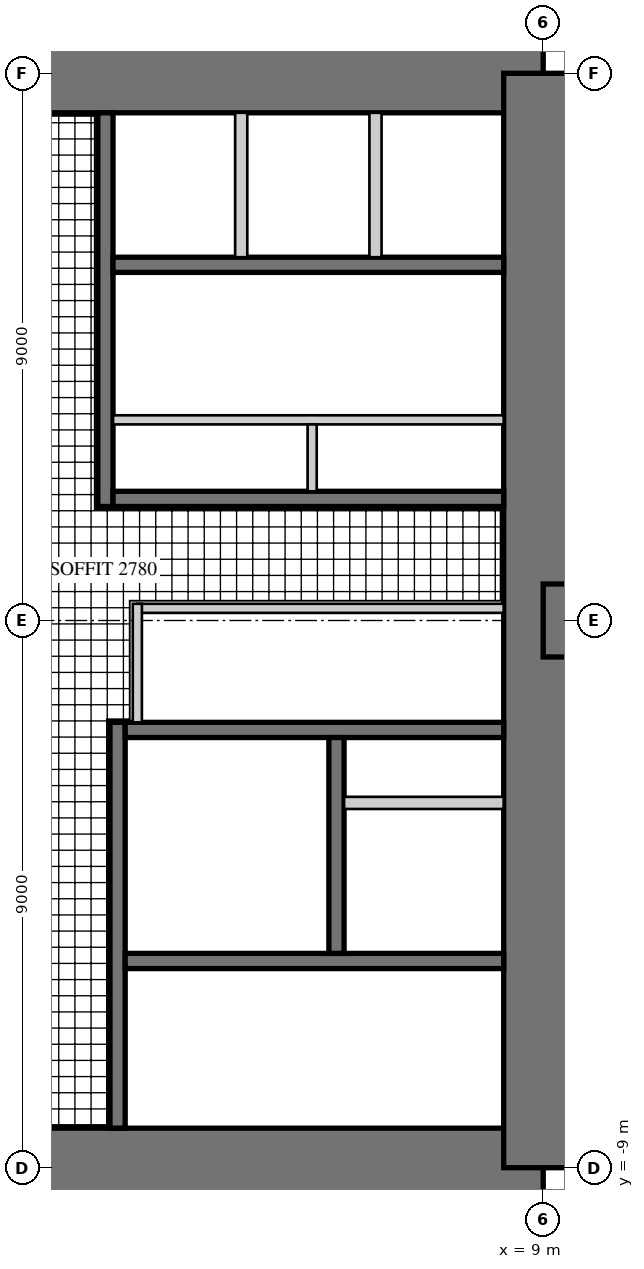
"""IFC4 building model, lengths in metres.
Left out: names, types, materials, properties, quantities, classifications, styles, units other than length and angle.
Written with IfcOpenShell. Run it as: python <this file> out.ifc"""

import sys

from ifc_helpers import new_model, si_unit, direction, frame, frame_2d, origin, place, context, subcontext, project, spatial, rectangle, extrude, element, fill, save


model = new_model("IFC4")
c1 = context("Model", 3, precision=1e-05, world=origin(), true_north=direction((0.0, 1.0)))
c2 = subcontext(c1, "Body", "Model", "MODEL_VIEW")
j1 = project(units=[si_unit("LENGTHUNIT", "METRE"), si_unit("PLANEANGLEUNIT", "RADIAN")], contexts=[c1])
p1 = place(None, origin())
s1 = spatial("IfcSite", under=j1, at=p1, CompositionType="ELEMENT")
p2 = place(p1, origin())
s2 = spatial("IfcBuilding", under=s1, at=p2, CompositionType="ELEMENT")
p3 = place(p2, frame((0.0, 0.0, 124.5)))
s3 = spatial("IfcBuildingStorey", under=s2, at=p3, CompositionType="ELEMENT", Elevation=124.5)
p4 = place(p3, frame((9.0, 9.0, 0.0), z_axis=(0.0, 0.0, 1.0), x_axis=(-1.0, 0.0, 0.0)))
e1 = element("IfcWall", 1, at=p4, inside=s3, PredefinedType="SHEAR", context=c2, shape_type="SweptSolid", body=[
    extrude(rectangle(XDim=18.0, YDim=1.3, at=frame_2d((9.0, 0.0))), origin(), (0.0, 0.0, 1.0), 4.0),
])
p5 = place(p4, frame((9.8, 0.0, 0.0)))
e2 = element("IfcOpeningElement", 2, at=p5, cuts=e1, PredefinedType="OPENING", context=c2, shape_type="SweptSolid", body=[
    extrude(rectangle(XDim=1.0, YDim=2.4, at=frame_2d((0.5, 1.2))), frame((0.0, 0.66, 0.0), z_axis=(0.0, -1.0, 0.0), x_axis=(1.0, 0.0, 0.0)), (0.0, 0.0, 1.0), 1.32),
])
p6 = place(p3, frame((-9.0, -9.0, 0.0), z_axis=(0.0, 0.0, 1.0), x_axis=(1.0, 0.0, 0.0)))
e3 = element("IfcWall", 3, at=p6, inside=s3, PredefinedType="SHEAR", context=c2, shape_type="SweptSolid", body=[
    extrude(rectangle(XDim=18.0, YDim=1.3, at=frame_2d((9.0, 0.0))), origin(), (0.0, 0.0, 1.0), 4.0),
])
p7 = place(p6, frame((9.8, 0.0, 0.0)))
e4 = element("IfcOpeningElement", 4, at=p7, cuts=e3, PredefinedType="OPENING", context=c2, shape_type="SweptSolid", body=[
    extrude(rectangle(XDim=1.0, YDim=2.4, at=frame_2d((0.5, 1.2))), frame((0.0, 0.66, 0.0), z_axis=(0.0, -1.0, 0.0), x_axis=(1.0, 0.0, 0.0)), (0.0, 0.0, 1.0), 1.32),
])
p8 = place(p3, frame((9.0, -9.0, 0.0), z_axis=(0.0, 0.0, 1.0), x_axis=(0.0, 1.0, 0.0)))
e5 = element("IfcWall", 5, at=p8, inside=s3, PredefinedType="SHEAR", context=c2, shape_type="SweptSolid", body=[
    extrude(rectangle(XDim=18.0, YDim=1.3, at=frame_2d((9.0, 0.0))), origin(), (0.0, 0.0, 1.0), 4.0),
])
p9 = place(p8, frame((9.8, 0.0, 0.0)))
e6 = element("IfcOpeningElement", 6, at=p9, cuts=e5, PredefinedType="OPENING", context=c2, shape_type="SweptSolid", body=[
    extrude(rectangle(XDim=1.0, YDim=2.4, at=frame_2d((0.5, 1.2))), frame((0.0, 0.66, 0.0), z_axis=(0.0, -1.0, 0.0), x_axis=(1.0, 0.0, 0.0)), (0.0, 0.0, 1.0), 1.32),
])
p10 = place(p3, frame((1.8, 1.875, 0.0), z_axis=(0.0, 0.0, 1.0), x_axis=(0.0, 1.0, 0.0)))
e7 = element("IfcWall", 7, at=p10, inside=s3, PredefinedType="SHEAR", context=c2, shape_type="SweptSolid", body=[
    extrude(rectangle(XDim=6.475, YDim=0.25, at=frame_2d((3.238, 0.0))), origin(), (0.0, 0.0, 1.0), 4.0),
])
p11 = place(p10, frame((1.875, 0.0, 0.0)))
e8 = element("IfcOpeningElement", 8, at=p11, cuts=e7, PredefinedType="OPENING", context=c2, shape_type="SweptSolid", body=[
    extrude(rectangle(XDim=1.6, YDim=2.4, at=frame_2d((0.8, 1.2))), frame((0.0, 0.135, 0.0), z_axis=(0.0, -1.0, 0.0), x_axis=(1.0, 0.0, 0.0)), (0.0, 0.0, 1.0), 0.27),
])
p12 = place(p3, frame((1.925, 2.0, 0.0), z_axis=(0.0, 0.0, 1.0), x_axis=(1.0, 0.0, 0.0)))
e9 = element("IfcWall", 9, at=p12, inside=s3, PredefinedType="SHEAR", context=c2, shape_type="SweptSolid", body=[
    extrude(rectangle(XDim=6.425, YDim=0.25, at=frame_2d((3.212, 0.0))), origin(), (0.0, 0.0, 1.0), 4.0),
])
p13 = place(p3, frame((1.925, 5.85, 0.0), z_axis=(0.0, 0.0, 1.0), x_axis=(1.0, 0.0, 0.0)))
e10 = element("IfcWall", 10, at=p13, inside=s3, PredefinedType="SHEAR", context=c2, shape_type="SweptSolid", body=[
    extrude(rectangle(XDim=6.425, YDim=0.25, at=frame_2d((3.212, 0.0))), origin(), (0.0, 0.0, 1.0), 4.0),
])
p14 = place(p13, frame((0.454, 0.0, 0.0)))
e11 = element("IfcOpeningElement", 11, at=p14, cuts=e10, PredefinedType="OPENING", context=c2, shape_type="SweptSolid", body=[
    extrude(rectangle(XDim=1.1, YDim=2.2, at=frame_2d((0.55, 1.1))), frame((0.0, 0.135, 0.0), z_axis=(0.0, -1.0, 0.0), x_axis=(1.0, 0.0, 0.0)), (0.0, 0.0, 1.0), 0.27),
])
p15 = place(p13, frame((2.663, 0.0, 0.0)))
e12 = element("IfcOpeningElement", 12, at=p15, cuts=e10, PredefinedType="OPENING", context=c2, shape_type="SweptSolid", body=[
    extrude(rectangle(XDim=1.1, YDim=2.2, at=frame_2d((0.55, 1.1))), frame((0.0, 0.135, 0.0), z_axis=(0.0, -1.0, 0.0), x_axis=(1.0, 0.0, 0.0)), (0.0, 0.0, 1.0), 0.27),
])
p16 = place(p13, frame((4.871, 0.0, 0.0)))
e13 = element("IfcOpeningElement", 13, at=p16, cuts=e10, PredefinedType="OPENING", context=c2, shape_type="SweptSolid", body=[
    extrude(rectangle(XDim=1.1, YDim=2.2, at=frame_2d((0.55, 1.1))), frame((0.0, 0.135, 0.0), z_axis=(0.0, -1.0, 0.0), x_axis=(1.0, 0.0, 0.0)), (0.0, 0.0, 1.0), 0.27),
])
p17 = place(p3, frame((1.925, 3.3, 0.0), z_axis=(0.0, 0.0, 1.0), x_axis=(1.0, 0.0, 0.0)))
e14 = element("IfcWall", 14, at=p17, inside=s3, PredefinedType="PARTITIONING", context=c2, shape_type="SweptSolid", body=[
    extrude(rectangle(XDim=6.425, YDim=0.15, at=frame_2d((3.212, 0.0))), origin(), (0.0, 0.0, 1.0), 4.0),
])
p18 = place(p17, frame((0.075, 0.0, 0.0)))
e15 = element("IfcOpeningElement", 15, at=p18, cuts=e14, PredefinedType="OPENING", context=c2, shape_type="SweptSolid", body=[
    extrude(rectangle(XDim=0.8, YDim=2.1, at=frame_2d((0.4, 1.05))), frame((0.0, 0.085, 0.0), z_axis=(0.0, -1.0, 0.0), x_axis=(1.0, 0.0, 0.0)), (0.0, 0.0, 1.0), 0.17),
])
p19 = place(p17, frame((3.675, 0.0, 0.0)))
e16 = element("IfcOpeningElement", 16, at=p19, cuts=e14, PredefinedType="OPENING", context=c2, shape_type="SweptSolid", body=[
    extrude(rectangle(XDim=0.8, YDim=2.1, at=frame_2d((0.4, 1.05))), frame((0.0, 0.085, 0.0), z_axis=(0.0, -1.0, 0.0), x_axis=(1.0, 0.0, 0.0)), (0.0, 0.0, 1.0), 0.17),
])
p20 = place(p3, frame((5.2, 2.125, 0.0), z_axis=(0.0, 0.0, 1.0), x_axis=(0.0, 1.0, 0.0)))
e17 = element("IfcWall", 17, at=p20, inside=s3, PredefinedType="PARTITIONING", context=c2, shape_type="SweptSolid", body=[
    extrude(rectangle(XDim=1.1, YDim=0.15, at=frame_2d((0.55, 0.0))), origin(), (0.0, 0.0, 1.0), 4.0),
])
for number, where, z_axis, x_axis in (
    (18, (4.033, 5.975, 0.0), (0.0, 0.0, 1.0), (0.0, 1.0, 0.0)),
    (19, (6.242, 5.975, 0.0), (0.0, 0.0, 1.0), (0.0, 1.0, 0.0)),
):
    element("IfcWall", number, at=place(p3, frame(where, z_axis=z_axis, x_axis=x_axis)), inside=s3, PredefinedType="PARTITIONING", context=c2, shape_type="SweptSolid", body=[
        extrude(rectangle(XDim=2.375, YDim=0.2, at=frame_2d((1.188, 0.0))), origin(), (0.0, 0.0, 1.0), 4.0),
    ])
p21 = place(p3, frame((2.0, -1.675, 0.0), z_axis=(0.0, 0.0, 1.0), x_axis=(0.0, -1.0, 0.0)))
e20 = element("IfcWall", 20, at=p21, inside=s3, PredefinedType="SHEAR", context=c2, shape_type="SweptSolid", body=[
    extrude(rectangle(XDim=6.675, YDim=0.25, at=frame_2d((3.337, 0.0))), origin(), (0.0, 0.0, 1.0), 4.0),
])
p22 = place(p21, frame((0.725, 0.0, 0.0)))
e21 = element("IfcOpeningElement", 21, at=p22, cuts=e20, PredefinedType="OPENING", context=c2, shape_type="SweptSolid", body=[
    extrude(rectangle(XDim=1.0, YDim=2.1, at=frame_2d((0.5, 1.05))), frame((0.0, 0.135, 0.0), z_axis=(0.0, -1.0, 0.0), x_axis=(1.0, 0.0, 0.0)), (0.0, 0.0, 1.0), 0.27),
])
p23 = place(p3, frame((2.125, -1.8, 0.0), z_axis=(0.0, 0.0, 1.0), x_axis=(1.0, 0.0, 0.0)))
e22 = element("IfcWall", 22, at=p23, inside=s3, PredefinedType="SHEAR", context=c2, shape_type="SweptSolid", body=[
    extrude(rectangle(XDim=6.225, YDim=0.25, at=frame_2d((3.113, 0.0))), origin(), (0.0, 0.0, 1.0), 4.0),
])
p24 = place(p3, frame((2.125, -5.6, 0.0), z_axis=(0.0, 0.0, 1.0), x_axis=(1.0, 0.0, 0.0)))
e23 = element("IfcWall", 23, at=p24, inside=s3, PredefinedType="SHEAR", context=c2, shape_type="SweptSolid", body=[
    extrude(rectangle(XDim=6.225, YDim=0.25, at=frame_2d((3.113, 0.0))), origin(), (0.0, 0.0, 1.0), 4.0),
])
p25 = place(p24, frame((0.175, 0.0, 0.0)))
e24 = element("IfcOpeningElement", 24, at=p25, cuts=e23, PredefinedType="OPENING", context=c2, shape_type="SweptSolid", body=[
    extrude(rectangle(XDim=1.0, YDim=2.1, at=frame_2d((0.5, 1.05))), frame((0.0, 0.135, 0.0), z_axis=(0.0, -1.0, 0.0), x_axis=(1.0, 0.0, 0.0)), (0.0, 0.0, 1.0), 0.27),
])
p26 = place(p3, frame((5.6, -1.925, 0.0), z_axis=(0.0, 0.0, 1.0), x_axis=(0.0, -1.0, 0.0)))
e25 = element("IfcWall", 25, at=p26, inside=s3, PredefinedType="SHEAR", context=c2, shape_type="SweptSolid", body=[
    extrude(rectangle(XDim=3.55, YDim=0.25, at=frame_2d((1.775, 0.0))), origin(), (0.0, 0.0, 1.0), 4.0),
])
p27 = place(p26, frame((1.525, 0.0, 0.0)))
e26 = element("IfcOpeningElement", 26, at=p27, cuts=e25, PredefinedType="OPENING", context=c2, shape_type="SweptSolid", body=[
    extrude(rectangle(XDim=1.1, YDim=2.2, at=frame_2d((0.55, 1.1))), frame((0.0, 0.135, 0.0), z_axis=(0.0, -1.0, 0.0), x_axis=(1.0, 0.0, 0.0)), (0.0, 0.0, 1.0), 0.27),
])
p28 = place(p26, frame((0.075, 0.0, 0.0)))
e27 = element("IfcOpeningElement", 27, at=p28, cuts=e25, PredefinedType="OPENING", context=c2, shape_type="SweptSolid", body=[
    extrude(rectangle(XDim=0.8, YDim=2.1, at=frame_2d((0.4, 1.05))), frame((0.0, 0.135, 0.0), z_axis=(0.0, -1.0, 0.0), x_axis=(1.0, 0.0, 0.0)), (0.0, 0.0, 1.0), 0.27),
])
p29 = place(p3, frame((5.725, -3.0, 0.0), z_axis=(0.0, 0.0, 1.0), x_axis=(1.0, 0.0, 0.0)))
e28 = element("IfcWall", 28, at=p29, inside=s3, PredefinedType="PARTITIONING", context=c2, shape_type="SweptSolid", body=[
    extrude(rectangle(XDim=2.625, YDim=0.2, at=frame_2d((1.312, 0.0))), origin(), (0.0, 0.0, 1.0), 4.0),
])
p30 = place(p3, frame((9.0, 0.0, 0.0), z_axis=(0.0, 0.0, 1.0), x_axis=(1.0, 0.0, 0.0)))
e29 = element("IfcWall", 29, at=p30, inside=s3, PredefinedType="SHEAR", context=c2, shape_type="SweptSolid", body=[
    extrude(rectangle(XDim=18.0, YDim=1.2, at=frame_2d((9.0, 0.0))), origin(), (0.0, 0.0, 1.0), 4.0),
])
p31 = place(p30, frame((9.8, 0.0, 0.0)))
e30 = element("IfcOpeningElement", 30, at=p31, cuts=e29, PredefinedType="OPENING", context=c2, shape_type="SweptSolid", body=[
    extrude(rectangle(XDim=1.0, YDim=2.2, at=frame_2d((0.5, 1.1))), frame((0.0, 0.61, 0.0), z_axis=(0.0, -1.0, 0.0), x_axis=(1.0, 0.0, 0.0)), (0.0, 0.0, 1.0), 1.22),
])
p32 = place(p3, frame((2.325, 0.2, 0.0), z_axis=(0.0, 0.0, 1.0), x_axis=(1.0, 0.0, 0.0)))
e31 = element("IfcWall", 31, at=p32, inside=s3, PredefinedType="PARTITIONING", context=c2, shape_type="SweptSolid", body=[
    extrude(rectangle(XDim=6.025, YDim=0.15, at=frame_2d((3.013, 0.0))), origin(), (0.0, 0.0, 1.0), 3.8),
])
p33 = place(p32, frame((0.4, 0.0, 0.0)))
e32 = element("IfcOpeningElement", 32, at=p33, cuts=e31, PredefinedType="OPENING", context=c2, shape_type="SweptSolid", body=[
    extrude(rectangle(XDim=1.0, YDim=2.1, at=frame_2d((0.5, 1.05))), frame((0.0, 0.085, 0.0), z_axis=(0.0, -1.0, 0.0), x_axis=(1.0, 0.0, 0.0)), (0.0, 0.0, 1.0), 0.17),
])
p34 = place(p3, frame((2.325, -1.675, 0.0), z_axis=(0.0, 0.0, 1.0), x_axis=(0.0, 1.0, 0.0)))
e33 = element("IfcWall", 33, at=p34, inside=s3, PredefinedType="PARTITIONING", context=c2, shape_type="SweptSolid", body=[
    extrude(rectangle(XDim=1.95, YDim=0.15, at=frame_2d((0.975, 0.0))), origin(), (0.0, 0.0, 1.0), 3.8),
])
p35 = place(p33, frame((1.0, 0.0, 0.0), z_axis=(0.0, 0.0, 1.0), x_axis=(-1.0, 0.0, 0.0)))
e34 = element("IfcDoor", 34, at=p35, inside=s3, OperationType="SINGLE_SWING_RIGHT", PredefinedType="DOOR", context=c2, shape_type="SweptSolid", body=[
    extrude(rectangle(XDim=1.0, YDim=2.1, at=frame_2d((0.5, 1.05))), frame((0.0, 0.025, 0.0), z_axis=(0.0, -1.0, 0.0), x_axis=(1.0, 0.0, 0.0)), (0.0, 0.0, 1.0), 0.05),
])
fill(e32, e34)
p36 = place(p7, frame((1.0, 0.0, 0.0), z_axis=(0.0, 0.0, 1.0), x_axis=(-1.0, 0.0, 0.0)))
e35 = element("IfcDoor", 35, at=p36, inside=s3, OperationType="SINGLE_SWING_RIGHT", PredefinedType="DOOR", context=c2, shape_type="SweptSolid", body=[
    extrude(rectangle(XDim=1.0, YDim=2.4, at=frame_2d((0.5, 1.2))), frame((0.0, -0.005, 0.0), z_axis=(0.0, -1.0, 0.0), x_axis=(1.0, 0.0, 0.0)), (0.0, 0.0, 1.0), 0.05),
])
fill(e4, e35)
p37 = place(p9, frame((1.0, 0.0, 0.0), z_axis=(0.0, 0.0, 1.0), x_axis=(-1.0, 0.0, 0.0)))
e36 = element("IfcDoor", 36, at=p37, inside=s3, OperationType="SINGLE_SWING_RIGHT", PredefinedType="DOOR", context=c2, shape_type="SweptSolid", body=[
    extrude(rectangle(XDim=1.0, YDim=2.4, at=frame_2d((0.5, 1.2))), frame((0.0, -0.005, 0.0), z_axis=(0.0, -1.0, 0.0), x_axis=(1.0, 0.0, 0.0)), (0.0, 0.0, 1.0), 0.05),
])
fill(e6, e36)
p38 = place(p14, origin())
e37 = element("IfcDoor", 37, at=p38, inside=s3, OperationType="DOUBLE_DOOR_SLIDING", PredefinedType="DOOR", context=c2, shape_type="SweptSolid", body=[
    extrude(rectangle(XDim=1.1, YDim=2.2, at=frame_2d((0.55, 1.1))), frame((0.0, 0.025, 0.0), z_axis=(0.0, -1.0, 0.0), x_axis=(1.0, 0.0, 0.0)), (0.0, 0.0, 1.0), 0.05),
])
fill(e11, e37)
p39 = place(p15, origin())
e38 = element("IfcDoor", 38, at=p39, inside=s3, OperationType="DOUBLE_DOOR_SLIDING", PredefinedType="DOOR", context=c2, shape_type="SweptSolid", body=[
    extrude(rectangle(XDim=1.1, YDim=2.2, at=frame_2d((0.55, 1.1))), frame((0.0, 0.025, 0.0), z_axis=(0.0, -1.0, 0.0), x_axis=(1.0, 0.0, 0.0)), (0.0, 0.0, 1.0), 0.05),
])
fill(e12, e38)
p40 = place(p16, origin())
e39 = element("IfcDoor", 39, at=p40, inside=s3, OperationType="DOUBLE_DOOR_SLIDING", PredefinedType="DOOR", context=c2, shape_type="SweptSolid", body=[
    extrude(rectangle(XDim=1.1, YDim=2.2, at=frame_2d((0.55, 1.1))), frame((0.0, 0.025, 0.0), z_axis=(0.0, -1.0, 0.0), x_axis=(1.0, 0.0, 0.0)), (0.0, 0.0, 1.0), 0.05),
])
fill(e13, e39)
p41 = place(p11, origin())
e40 = element("IfcDoor", 40, at=p41, inside=s3, OperationType="DOUBLE_DOOR_DOUBLE_SWING", PredefinedType="DOOR", context=c2, shape_type="SweptSolid", body=[
    extrude(rectangle(XDim=1.6, YDim=2.4, at=frame_2d((0.8, 1.2))), frame((0.0, 0.025, 0.0), z_axis=(0.0, -1.0, 0.0), x_axis=(1.0, 0.0, 0.0)), (0.0, 0.0, 1.0), 0.05),
])
fill(e8, e40)
p42 = place(p18, frame((0.8, 0.0, 0.0), z_axis=(0.0, 0.0, 1.0), x_axis=(-1.0, 0.0, 0.0)))
e41 = element("IfcDoor", 41, at=p42, inside=s3, OperationType="SINGLE_SWING_RIGHT", PredefinedType="DOOR", context=c2, shape_type="SweptSolid", body=[
    extrude(rectangle(XDim=0.8, YDim=2.1, at=frame_2d((0.4, 1.05))), frame((0.0, 0.025, 0.0), z_axis=(0.0, -1.0, 0.0), x_axis=(1.0, 0.0, 0.0)), (0.0, 0.0, 1.0), 0.05),
])
fill(e15, e41)
p43 = place(p19, frame((0.8, 0.0, 0.0), z_axis=(0.0, 0.0, 1.0), x_axis=(-1.0, 0.0, 0.0)))
e42 = element("IfcDoor", 42, at=p43, inside=s3, OperationType="SINGLE_SWING_RIGHT", PredefinedType="DOOR", context=c2, shape_type="SweptSolid", body=[
    extrude(rectangle(XDim=0.8, YDim=2.1, at=frame_2d((0.4, 1.05))), frame((0.0, 0.025, 0.0), z_axis=(0.0, -1.0, 0.0), x_axis=(1.0, 0.0, 0.0)), (0.0, 0.0, 1.0), 0.05),
])
fill(e16, e42)
p44 = place(p22, origin())
e43 = element("IfcDoor", 43, at=p44, inside=s3, OperationType="SINGLE_SWING_LEFT", PredefinedType="DOOR", context=c2, shape_type="SweptSolid", body=[
    extrude(rectangle(XDim=1.0, YDim=2.1, at=frame_2d((0.5, 1.05))), frame((0.0, 0.025, 0.0), z_axis=(0.0, -1.0, 0.0), x_axis=(1.0, 0.0, 0.0)), (0.0, 0.0, 1.0), 0.05),
])
fill(e21, e43)
p45 = place(p25, frame((1.0, 0.0, 0.0), z_axis=(0.0, 0.0, 1.0), x_axis=(-1.0, 0.0, 0.0)))
e44 = element("IfcDoor", 44, at=p45, inside=s3, OperationType="SINGLE_SWING_RIGHT", PredefinedType="DOOR", context=c2, shape_type="SweptSolid", body=[
    extrude(rectangle(XDim=1.0, YDim=2.1, at=frame_2d((0.5, 1.05))), frame((0.0, 0.025, 0.0), z_axis=(0.0, -1.0, 0.0), x_axis=(1.0, 0.0, 0.0)), (0.0, 0.0, 1.0), 0.05),
])
fill(e24, e44)
p46 = place(p27, origin())
e45 = element("IfcDoor", 45, at=p46, inside=s3, OperationType="DOUBLE_DOOR_SLIDING", PredefinedType="DOOR", context=c2, shape_type="SweptSolid", body=[
    extrude(rectangle(XDim=1.1, YDim=2.2, at=frame_2d((0.55, 1.1))), frame((0.0, 0.025, 0.0), z_axis=(0.0, -1.0, 0.0), x_axis=(1.0, 0.0, 0.0)), (0.0, 0.0, 1.0), 0.05),
])
fill(e26, e45)
p47 = place(p28, origin())
e46 = element("IfcDoor", 46, at=p47, inside=s3, OperationType="SINGLE_SWING_LEFT", PredefinedType="DOOR", context=c2, shape_type="SweptSolid", body=[
    extrude(rectangle(XDim=0.8, YDim=2.1, at=frame_2d((0.4, 1.05))), frame((0.0, 0.025, 0.0), z_axis=(0.0, -1.0, 0.0), x_axis=(1.0, 0.0, 0.0)), (0.0, 0.0, 1.0), 0.05),
])
fill(e27, e46)
save(model, sys.argv[1])
